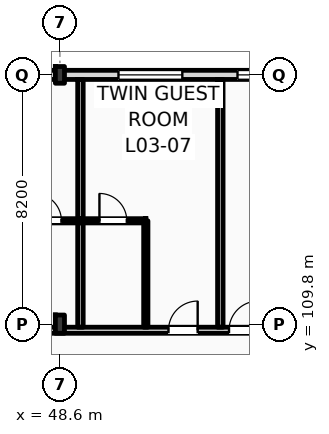
"""IFC4 building model, lengths in metres.
Left out: names, types, materials, properties, quantities, classifications, styles, units other than length and angle.
Written with IfcOpenShell. Run it as: python <this file> out.ifc"""

import sys

from ifc_helpers import new_model, si_unit, direction, frame, frame_2d, origin, origin_2d, place, context, subcontext, project, spatial, rectangle, i_section, extrude, element, fill, save


model = new_model("IFC4")
c1 = context("Model", 3, precision=1e-05, world=origin(), true_north=direction((0.0, 1.0)))
c2 = subcontext(c1, "Body", "Model", "MODEL_VIEW")
j1 = project(units=[si_unit("LENGTHUNIT", "METRE"), si_unit("PLANEANGLEUNIT", "RADIAN")], contexts=[c1])
p1 = place(None, origin())
s1 = spatial("IfcSite", under=j1, at=p1, CompositionType="ELEMENT")
p2 = place(p1, origin())
s2 = spatial("IfcBuilding", under=s1, at=p2, CompositionType="ELEMENT")
p3 = place(p2, frame((0.0, 0.0, 16.2)))
s3 = spatial("IfcBuildingStorey", under=s2, at=p3, CompositionType="ELEMENT", Elevation=16.2)
p4 = place(p3, frame((48.6, 109.8, 0.0), z_axis=(0.0, 0.0, 1.0), x_axis=(1.0, 0.0, 0.0)))
e1 = element("IfcColumn", 1, at=p4, inside=s3, PredefinedType="COLUMN", context=c2, shape_type="SweptSolid", body=[
    extrude(i_section(OverallWidth=0.3, OverallDepth=0.6, WebThickness=0.015, FlangeThickness=0.03, FilletRadius=0.027, at=origin_2d()), origin(), (0.0, 0.0, 1.0), 4.2),
])
p5 = place(p3, frame((48.6, 118.0, 0.0), z_axis=(0.0, 0.0, 1.0), x_axis=(1.0, 0.0, 0.0)))
e2 = element("IfcColumn", 2, at=p5, inside=s3, PredefinedType="COLUMN", context=c2, shape_type="SweptSolid", body=[
    extrude(i_section(OverallWidth=0.3, OverallDepth=0.55, WebThickness=0.015, FlangeThickness=0.029, FilletRadius=0.027, at=origin_2d()), origin(), (0.0, 0.0, 1.0), 4.2),
])
p6 = place(p3, frame((22.5, 118.0, 0.0), z_axis=(0.0, 0.0, 1.0), x_axis=(1.0, 0.0, 0.0)))
e3 = element("IfcWall", 3, at=p6, inside=s3, PredefinedType="STANDARD", context=c2, shape_type="SweptSolid", body=[
    extrude(rectangle(XDim=97.5, YDim=0.3, at=frame_2d((48.75, 0.0))), origin(), (0.0, 0.0, 1.0), 3.36),
])
p7 = place(p6, frame((3.721, 0.0, 0.9)))
e4 = element("IfcOpeningElement", 4, at=p7, cuts=e3, PredefinedType="OPENING", context=c2, shape_type="SweptSolid", body=[
    extrude(rectangle(XDim=0.9, YDim=1.8, at=frame_2d((0.45, 0.9))), frame((0.0, 0.16, 0.0), z_axis=(0.0, -1.0, 0.0), x_axis=(1.0, 0.0, 0.0)), (0.0, 0.0, 1.0), 0.32),
])
p8 = place(p6, frame((6.447, 0.0, 0.9)))
e5 = element("IfcOpeningElement", 5, at=p8, cuts=e3, PredefinedType="OPENING", context=c2, shape_type="SweptSolid", body=[
    extrude(rectangle(XDim=1.35, YDim=1.85, at=frame_2d((0.675, 0.925))), frame((0.0, 0.16, 0.0), z_axis=(0.0, -1.0, 0.0), x_axis=(1.0, 0.0, 0.0)), (0.0, 0.0, 1.0), 0.32),
])
p9 = place(p6, frame((11.363, 0.0, 0.9)))
e6 = element("IfcOpeningElement", 6, at=p9, cuts=e3, PredefinedType="OPENING", context=c2, shape_type="SweptSolid", body=[
    extrude(rectangle(XDim=1.5, YDim=1.9, at=frame_2d((0.75, 0.95))), frame((0.0, 0.16, 0.0), z_axis=(0.0, -1.0, 0.0), x_axis=(1.0, 0.0, 0.0)), (0.0, 0.0, 1.0), 0.32),
])
p10 = place(p6, frame((15.078, 0.0, 0.9)))
e7 = element("IfcOpeningElement", 7, at=p10, cuts=e3, PredefinedType="OPENING", context=c2, shape_type="SweptSolid", body=[
    extrude(rectangle(XDim=1.65, YDim=1.95, at=frame_2d((0.825, 0.975))), frame((0.0, 0.16, 0.0), z_axis=(0.0, -1.0, 0.0), x_axis=(1.0, 0.0, 0.0)), (0.0, 0.0, 1.0), 0.32),
])
p11 = place(p6, frame((19.395, 0.0, 0.9)))
e8 = element("IfcOpeningElement", 8, at=p11, cuts=e3, PredefinedType="OPENING", context=c2, shape_type="SweptSolid", body=[
    extrude(rectangle(XDim=1.8, YDim=2.0, at=frame_2d((0.9, 1.0))), frame((0.0, 0.16, 0.0), z_axis=(0.0, -1.0, 0.0), x_axis=(1.0, 0.0, 0.0)), (0.0, 0.0, 1.0), 0.32),
])
p12 = place(p6, frame((23.31, 0.0, 0.9)))
e9 = element("IfcOpeningElement", 9, at=p12, cuts=e3, PredefinedType="OPENING", context=c2, shape_type="SweptSolid", body=[
    extrude(rectangle(XDim=1.95, YDim=2.05, at=frame_2d((0.975, 1.025))), frame((0.0, 0.16, 0.0), z_axis=(0.0, -1.0, 0.0), x_axis=(1.0, 0.0, 0.0)), (0.0, 0.0, 1.0), 0.32),
])
p13 = place(p6, frame((28.026, 0.0, 0.9)))
e10 = element("IfcOpeningElement", 10, at=p13, cuts=e3, PredefinedType="OPENING", context=c2, shape_type="SweptSolid", body=[
    extrude(rectangle(XDim=2.1, YDim=2.1, at=frame_2d((1.05, 1.05))), frame((0.0, 0.16, 0.0), z_axis=(0.0, -1.0, 0.0), x_axis=(1.0, 0.0, 0.0)), (0.0, 0.0, 1.0), 0.32),
])
p14 = place(p6, frame((31.941, 0.0, 0.9)))
e11 = element("IfcOpeningElement", 11, at=p14, cuts=e3, PredefinedType="OPENING", context=c2, shape_type="SweptSolid", body=[
    extrude(rectangle(XDim=1.1, YDim=2.15, at=frame_2d((0.55, 1.075))), frame((0.0, 0.16, 0.0), z_axis=(0.0, -1.0, 0.0), x_axis=(1.0, 0.0, 0.0)), (0.0, 0.0, 1.0), 0.32),
])
p15 = place(p6, frame((36.657, 0.0, 0.9)))
e12 = element("IfcOpeningElement", 12, at=p15, cuts=e3, PredefinedType="OPENING", context=c2, shape_type="SweptSolid", body=[
    extrude(rectangle(XDim=2.4, YDim=2.2, at=frame_2d((1.2, 1.1))), frame((0.0, 0.16, 0.0), z_axis=(0.0, -1.0, 0.0), x_axis=(1.0, 0.0, 0.0)), (0.0, 0.0, 1.0), 0.32),
])
p16 = place(p6, frame((42.574, 0.0, 0.9)))
e13 = element("IfcOpeningElement", 13, at=p16, cuts=e3, PredefinedType="OPENING", context=c2, shape_type="SweptSolid", body=[
    extrude(rectangle(XDim=1.35, YDim=2.25, at=frame_2d((0.675, 1.125))), frame((0.0, 0.16, 0.0), z_axis=(0.0, -1.0, 0.0), x_axis=(1.0, 0.0, 0.0)), (0.0, 0.0, 1.0), 0.32),
])
p17 = place(p6, frame((45.289, 0.0, 0.9)))
e14 = element("IfcOpeningElement", 14, at=p17, cuts=e3, PredefinedType="OPENING", context=c2, shape_type="SweptSolid", body=[
    extrude(rectangle(XDim=2.7, YDim=2.28, at=frame_2d((1.35, 1.14))), frame((0.0, 0.16, 0.0), z_axis=(0.0, -1.0, 0.0), x_axis=(1.0, 0.0, 0.0)), (0.0, 0.0, 1.0), 0.32),
])
p18 = place(p6, frame((50.406, 0.0, 0.9)))
e15 = element("IfcOpeningElement", 15, at=p18, cuts=e3, PredefinedType="OPENING", context=c2, shape_type="SweptSolid", body=[
    extrude(rectangle(XDim=1.8, YDim=2.28, at=frame_2d((0.9, 1.14))), frame((0.0, 0.16, 0.0), z_axis=(0.0, -1.0, 0.0), x_axis=(1.0, 0.0, 0.0)), (0.0, 0.0, 1.0), 0.32),
])
p19 = place(p6, frame((53.922, 0.0, 0.9)))
e16 = element("IfcOpeningElement", 16, at=p19, cuts=e3, PredefinedType="OPENING", context=c2, shape_type="SweptSolid", body=[
    extrude(rectangle(XDim=1.8, YDim=2.28, at=frame_2d((0.9, 1.14))), frame((0.0, 0.16, 0.0), z_axis=(0.0, -1.0, 0.0), x_axis=(1.0, 0.0, 0.0)), (0.0, 0.0, 1.0), 0.32),
])
p20 = place(p6, frame((58.332, 0.0, 0.9)))
e17 = element("IfcOpeningElement", 17, at=p20, cuts=e3, PredefinedType="OPENING", context=c2, shape_type="SweptSolid", body=[
    extrude(rectangle(XDim=2.961, YDim=2.28, at=frame_2d((1.48, 1.14))), frame((0.0, 0.16, 0.0), z_axis=(0.0, -1.0, 0.0), x_axis=(1.0, 0.0, 0.0)), (0.0, 0.0, 1.0), 0.32),
])
p21 = place(p6, frame((62.513, 0.0, 0.9)))
e18 = element("IfcOpeningElement", 18, at=p21, cuts=e3, PredefinedType="OPENING", context=c2, shape_type="SweptSolid", body=[
    extrude(rectangle(XDim=1.8, YDim=2.28, at=frame_2d((0.9, 1.14))), frame((0.0, 0.16, 0.0), z_axis=(0.0, -1.0, 0.0), x_axis=(1.0, 0.0, 0.0)), (0.0, 0.0, 1.0), 0.32),
])
p22 = place(p6, frame((67.114, 0.0, 0.9)))
e19 = element("IfcOpeningElement", 19, at=p22, cuts=e3, PredefinedType="OPENING", context=c2, shape_type="SweptSolid", body=[
    extrude(rectangle(XDim=2.961, YDim=2.28, at=frame_2d((1.48, 1.14))), frame((0.0, 0.16, 0.0), z_axis=(0.0, -1.0, 0.0), x_axis=(1.0, 0.0, 0.0)), (0.0, 0.0, 1.0), 0.32),
])
p23 = place(p6, frame((73.695, 0.0, 0.9)))
e20 = element("IfcOpeningElement", 20, at=p23, cuts=e3, PredefinedType="OPENING", context=c2, shape_type="SweptSolid", body=[
    extrude(rectangle(XDim=1.1, YDim=2.28, at=frame_2d((0.55, 1.14))), frame((0.0, 0.16, 0.0), z_axis=(0.0, -1.0, 0.0), x_axis=(1.0, 0.0, 0.0)), (0.0, 0.0, 1.0), 0.32),
])
p24 = place(p6, frame((75.895, 0.0, 0.9)))
e21 = element("IfcOpeningElement", 21, at=p24, cuts=e3, PredefinedType="OPENING", context=c2, shape_type="SweptSolid", body=[
    extrude(rectangle(XDim=2.961, YDim=2.28, at=frame_2d((1.48, 1.14))), frame((0.0, 0.16, 0.0), z_axis=(0.0, -1.0, 0.0), x_axis=(1.0, 0.0, 0.0)), (0.0, 0.0, 1.0), 0.32),
])
p25 = place(p6, frame((81.676, 0.0, 0.9)))
e22 = element("IfcOpeningElement", 22, at=p25, cuts=e3, PredefinedType="OPENING", context=c2, shape_type="SweptSolid", body=[
    extrude(rectangle(XDim=1.8, YDim=2.28, at=frame_2d((0.9, 1.14))), frame((0.0, 0.16, 0.0), z_axis=(0.0, -1.0, 0.0), x_axis=(1.0, 0.0, 0.0)), (0.0, 0.0, 1.0), 0.32),
])
p26 = place(p6, frame((84.677, 0.0, 0.9)))
e23 = element("IfcOpeningElement", 23, at=p26, cuts=e3, PredefinedType="OPENING", context=c2, shape_type="SweptSolid", body=[
    extrude(rectangle(XDim=2.961, YDim=2.28, at=frame_2d((1.48, 1.14))), frame((0.0, 0.16, 0.0), z_axis=(0.0, -1.0, 0.0), x_axis=(1.0, 0.0, 0.0)), (0.0, 0.0, 1.0), 0.32),
])
p27 = place(p6, frame((89.999, 0.0, 0.9)))
e24 = element("IfcOpeningElement", 24, at=p27, cuts=e3, PredefinedType="OPENING", context=c2, shape_type="SweptSolid", body=[
    extrude(rectangle(XDim=1.1, YDim=1.5, at=frame_2d((0.55, 0.75))), frame((0.0, 0.16, 0.0), z_axis=(0.0, -1.0, 0.0), x_axis=(1.0, 0.0, 0.0)), (0.0, 0.0, 1.0), 0.32),
])
p28 = place(p6, frame((94.35, 0.0, 0.9)))
e25 = element("IfcOpeningElement", 25, at=p28, cuts=e3, PredefinedType="OPENING", context=c2, shape_type="SweptSolid", body=[
    extrude(rectangle(XDim=1.25, YDim=1.6, at=frame_2d((0.625, 0.8))), frame((0.0, 0.16, 0.0), z_axis=(0.0, -1.0, 0.0), x_axis=(1.0, 0.0, 0.0)), (0.0, 0.0, 1.0), 0.32),
])
p29 = place(p3, frame((10.65, 109.6, 0.0), z_axis=(0.0, 0.0, 1.0), x_axis=(1.0, 0.0, 0.0)))
e26 = element("IfcWall", 26, at=p29, inside=s3, PredefinedType="PARTITIONING", context=c2, shape_type="SweptSolid", body=[
    extrude(rectangle(XDim=109.21, YDim=0.2, at=frame_2d((54.605, 0.0))), origin(), (0.0, 0.0, 1.0), 3.36),
])
p30 = place(p29, frame((15.43, 0.0, 0.0)))
e27 = element("IfcOpeningElement", 27, at=p30, cuts=e26, PredefinedType="OPENING", context=c2, shape_type="SweptSolid", body=[
    extrude(rectangle(XDim=1.02, YDim=2.2, at=frame_2d((0.51, 1.1))), frame((0.0, 0.11, 0.0), z_axis=(0.0, -1.0, 0.0), x_axis=(1.0, 0.0, 0.0)), (0.0, 0.0, 1.0), 0.22),
])
p31 = place(p29, frame((19.537, 0.0, 0.0)))
e28 = element("IfcOpeningElement", 28, at=p31, cuts=e26, PredefinedType="OPENING", context=c2, shape_type="SweptSolid", body=[
    extrude(rectangle(XDim=1.02, YDim=2.2, at=frame_2d((0.51, 1.1))), frame((0.0, 0.11, 0.0), z_axis=(0.0, -1.0, 0.0), x_axis=(1.0, 0.0, 0.0)), (0.0, 0.0, 1.0), 0.22),
])
p32 = place(p29, frame((23.928, 0.0, 0.0)))
e29 = element("IfcOpeningElement", 29, at=p32, cuts=e26, PredefinedType="OPENING", context=c2, shape_type="SweptSolid", body=[
    extrude(rectangle(XDim=1.02, YDim=2.2, at=frame_2d((0.51, 1.1))), frame((0.0, 0.11, 0.0), z_axis=(0.0, -1.0, 0.0), x_axis=(1.0, 0.0, 0.0)), (0.0, 0.0, 1.0), 0.22),
])
p33 = place(p29, frame((26.169, 0.0, 0.0)))
e30 = element("IfcOpeningElement", 30, at=p33, cuts=e26, PredefinedType="OPENING", context=c2, shape_type="SweptSolid", body=[
    extrude(rectangle(XDim=1.02, YDim=2.2, at=frame_2d((0.51, 1.1))), frame((0.0, 0.11, 0.0), z_axis=(0.0, -1.0, 0.0), x_axis=(1.0, 0.0, 0.0)), (0.0, 0.0, 1.0), 0.22),
])
p34 = place(p29, frame((32.739, 0.0, 0.0)))
e31 = element("IfcOpeningElement", 31, at=p34, cuts=e26, PredefinedType="OPENING", context=c2, shape_type="SweptSolid", body=[
    extrude(rectangle(XDim=0.96, YDim=2.2, at=frame_2d((0.48, 1.1))), frame((0.0, 0.11, 0.0), z_axis=(0.0, -1.0, 0.0), x_axis=(1.0, 0.0, 0.0)), (0.0, 0.0, 1.0), 0.22),
])
p35 = place(p29, frame((34.98, 0.0, 0.0)))
e32 = element("IfcOpeningElement", 32, at=p35, cuts=e26, PredefinedType="OPENING", context=c2, shape_type="SweptSolid", body=[
    extrude(rectangle(XDim=0.96, YDim=2.2, at=frame_2d((0.48, 1.1))), frame((0.0, 0.11, 0.0), z_axis=(0.0, -1.0, 0.0), x_axis=(1.0, 0.0, 0.0)), (0.0, 0.0, 1.0), 0.22),
])
p36 = place(p29, frame((41.521, 0.0, 0.0)))
e33 = element("IfcOpeningElement", 33, at=p36, cuts=e26, PredefinedType="OPENING", context=c2, shape_type="SweptSolid", body=[
    extrude(rectangle(XDim=0.96, YDim=2.2, at=frame_2d((0.48, 1.1))), frame((0.0, 0.11, 0.0), z_axis=(0.0, -1.0, 0.0), x_axis=(1.0, 0.0, 0.0)), (0.0, 0.0, 1.0), 0.22),
])
p37 = place(p29, frame((43.512, 0.0, 0.0)))
e34 = element("IfcOpeningElement", 34, at=p37, cuts=e26, PredefinedType="OPENING", context=c2, shape_type="SweptSolid", body=[
    extrude(rectangle(XDim=0.96, YDim=2.2, at=frame_2d((0.48, 1.1))), frame((0.0, 0.11, 0.0), z_axis=(0.0, -1.0, 0.0), x_axis=(1.0, 0.0, 0.0)), (0.0, 0.0, 1.0), 0.22),
])
p38 = place(p29, frame((50.303, 0.0, 0.0)))
e35 = element("IfcOpeningElement", 35, at=p38, cuts=e26, PredefinedType="OPENING", context=c2, shape_type="SweptSolid", body=[
    extrude(rectangle(XDim=0.96, YDim=2.2, at=frame_2d((0.48, 1.1))), frame((0.0, 0.11, 0.0), z_axis=(0.0, -1.0, 0.0), x_axis=(1.0, 0.0, 0.0)), (0.0, 0.0, 1.0), 0.22),
])
p39 = place(p29, frame((54.944, 0.0, 0.0)))
e36 = element("IfcOpeningElement", 36, at=p39, cuts=e26, PredefinedType="OPENING", context=c2, shape_type="SweptSolid", body=[
    extrude(rectangle(XDim=0.96, YDim=2.2, at=frame_2d((0.48, 1.1))), frame((0.0, 0.11, 0.0), z_axis=(0.0, -1.0, 0.0), x_axis=(1.0, 0.0, 0.0)), (0.0, 0.0, 1.0), 0.22),
])
p40 = place(p29, frame((59.085, 0.0, 0.0)))
e37 = element("IfcOpeningElement", 37, at=p40, cuts=e26, PredefinedType="OPENING", context=c2, shape_type="SweptSolid", body=[
    extrude(rectangle(XDim=0.96, YDim=2.2, at=frame_2d((0.48, 1.1))), frame((0.0, 0.11, 0.0), z_axis=(0.0, -1.0, 0.0), x_axis=(1.0, 0.0, 0.0)), (0.0, 0.0, 1.0), 0.22),
])
p41 = place(p29, frame((63.476, 0.0, 0.0)))
e38 = element("IfcOpeningElement", 38, at=p41, cuts=e26, PredefinedType="OPENING", context=c2, shape_type="SweptSolid", body=[
    extrude(rectangle(XDim=0.96, YDim=2.2, at=frame_2d((0.48, 1.1))), frame((0.0, 0.11, 0.0), z_axis=(0.0, -1.0, 0.0), x_axis=(1.0, 0.0, 0.0)), (0.0, 0.0, 1.0), 0.22),
])
p42 = place(p29, frame((65.716, 0.0, 0.0)))
e39 = element("IfcOpeningElement", 39, at=p42, cuts=e26, PredefinedType="OPENING", context=c2, shape_type="SweptSolid", body=[
    extrude(rectangle(XDim=0.96, YDim=2.2, at=frame_2d((0.48, 1.1))), frame((0.0, 0.11, 0.0), z_axis=(0.0, -1.0, 0.0), x_axis=(1.0, 0.0, 0.0)), (0.0, 0.0, 1.0), 0.22),
])
p43 = place(p29, frame((72.257, 0.0, 0.0)))
e40 = element("IfcOpeningElement", 40, at=p43, cuts=e26, PredefinedType="OPENING", context=c2, shape_type="SweptSolid", body=[
    extrude(rectangle(XDim=0.96, YDim=2.2, at=frame_2d((0.48, 1.1))), frame((0.0, 0.11, 0.0), z_axis=(0.0, -1.0, 0.0), x_axis=(1.0, 0.0, 0.0)), (0.0, 0.0, 1.0), 0.22),
])
p44 = place(p29, frame((74.498, 0.0, 0.0)))
e41 = element("IfcOpeningElement", 41, at=p44, cuts=e26, PredefinedType="OPENING", context=c2, shape_type="SweptSolid", body=[
    extrude(rectangle(XDim=0.96, YDim=2.2, at=frame_2d((0.48, 1.1))), frame((0.0, 0.11, 0.0), z_axis=(0.0, -1.0, 0.0), x_axis=(1.0, 0.0, 0.0)), (0.0, 0.0, 1.0), 0.22),
])
p45 = place(p29, frame((81.039, 0.0, 0.0)))
e42 = element("IfcOpeningElement", 42, at=p45, cuts=e26, PredefinedType="OPENING", context=c2, shape_type="SweptSolid", body=[
    extrude(rectangle(XDim=0.96, YDim=2.2, at=frame_2d((0.48, 1.1))), frame((0.0, 0.11, 0.0), z_axis=(0.0, -1.0, 0.0), x_axis=(1.0, 0.0, 0.0)), (0.0, 0.0, 1.0), 0.22),
])
p46 = place(p29, frame((85.68, 0.0, 0.0)))
e43 = element("IfcOpeningElement", 43, at=p46, cuts=e26, PredefinedType="OPENING", context=c2, shape_type="SweptSolid", body=[
    extrude(rectangle(XDim=0.96, YDim=2.2, at=frame_2d((0.48, 1.1))), frame((0.0, 0.11, 0.0), z_axis=(0.0, -1.0, 0.0), x_axis=(1.0, 0.0, 0.0)), (0.0, 0.0, 1.0), 0.22),
])
p47 = place(p29, frame((89.82, 0.0, 0.0)))
e44 = element("IfcOpeningElement", 44, at=p47, cuts=e26, PredefinedType="OPENING", context=c2, shape_type="SweptSolid", body=[
    extrude(rectangle(XDim=0.96, YDim=2.2, at=frame_2d((0.48, 1.1))), frame((0.0, 0.11, 0.0), z_axis=(0.0, -1.0, 0.0), x_axis=(1.0, 0.0, 0.0)), (0.0, 0.0, 1.0), 0.22),
])
p48 = place(p29, frame((94.211, 0.0, 0.0)))
e45 = element("IfcOpeningElement", 45, at=p48, cuts=e26, PredefinedType="OPENING", context=c2, shape_type="SweptSolid", body=[
    extrude(rectangle(XDim=0.96, YDim=2.2, at=frame_2d((0.48, 1.1))), frame((0.0, 0.11, 0.0), z_axis=(0.0, -1.0, 0.0), x_axis=(1.0, 0.0, 0.0)), (0.0, 0.0, 1.0), 0.22),
])
p49 = place(p29, frame((98.602, 0.0, 0.0)))
e46 = element("IfcOpeningElement", 46, at=p49, cuts=e26, PredefinedType="OPENING", context=c2, shape_type="SweptSolid", body=[
    extrude(rectangle(XDim=0.96, YDim=2.2, at=frame_2d((0.48, 1.1))), frame((0.0, 0.11, 0.0), z_axis=(0.0, -1.0, 0.0), x_axis=(1.0, 0.0, 0.0)), (0.0, 0.0, 1.0), 0.22),
])
p50 = place(p29, frame((102.993, 0.0, 0.0)))
e47 = element("IfcOpeningElement", 47, at=p50, cuts=e26, PredefinedType="OPENING", context=c2, shape_type="SweptSolid", body=[
    extrude(rectangle(XDim=0.96, YDim=2.2, at=frame_2d((0.48, 1.1))), frame((0.0, 0.11, 0.0), z_axis=(0.0, -1.0, 0.0), x_axis=(1.0, 0.0, 0.0)), (0.0, 0.0, 1.0), 0.22),
])
p51 = place(p29, frame((105.269, 0.0, 0.0)))
e48 = element("IfcOpeningElement", 48, at=p51, cuts=e26, PredefinedType="OPENING", context=c2, shape_type="SweptSolid", body=[
    extrude(rectangle(XDim=0.96, YDim=2.2, at=frame_2d((0.48, 1.1))), frame((0.0, 0.11, 0.0), z_axis=(0.0, -1.0, 0.0), x_axis=(1.0, 0.0, 0.0)), (0.0, 0.0, 1.0), 0.22),
])
p52 = place(p29, frame((2.716, 0.0, 0.0)))
e49 = element("IfcOpeningElement", 49, at=p52, cuts=e26, PredefinedType="OPENING", context=c2, shape_type="SweptSolid", body=[
    extrude(rectangle(XDim=1.35, YDim=2.25, at=frame_2d((0.675, 1.125))), frame((0.0, 0.11, 0.0), z_axis=(0.0, -1.0, 0.0), x_axis=(1.0, 0.0, 0.0)), (0.0, 0.0, 1.0), 0.22),
])
p53 = place(p29, frame((6.65, 0.0, 0.0)))
e50 = element("IfcOpeningElement", 50, at=p53, cuts=e26, PredefinedType="OPENING", context=c2, shape_type="SweptSolid", body=[
    extrude(rectangle(XDim=1.35, YDim=2.25, at=frame_2d((0.675, 1.125))), frame((0.0, 0.11, 0.0), z_axis=(0.0, -1.0, 0.0), x_axis=(1.0, 0.0, 0.0)), (0.0, 0.0, 1.0), 0.22),
])
p54 = place(p29, frame((10.583, 0.0, 0.0)))
e51 = element("IfcOpeningElement", 51, at=p54, cuts=e26, PredefinedType="OPENING", context=c2, shape_type="SweptSolid", body=[
    extrude(rectangle(XDim=1.35, YDim=2.25, at=frame_2d((0.675, 1.125))), frame((0.0, 0.11, 0.0), z_axis=(0.0, -1.0, 0.0), x_axis=(1.0, 0.0, 0.0)), (0.0, 0.0, 1.0), 0.22),
])
p55 = place(p3, frame((49.275, 109.7, 0.0), z_axis=(0.0, 0.0, 1.0), x_axis=(0.0, 1.0, 0.0)))
e52 = element("IfcWall", 52, at=p55, inside=s3, PredefinedType="PARTITIONING", context=c2, shape_type="SweptSolid", body=[
    extrude(rectangle(XDim=8.15, YDim=0.18, at=frame_2d((4.075, 0.0))), origin(), (0.0, 0.0, 1.0), 3.92),
])
p56 = place(p3, frame((47.125, 113.2, 0.0), z_axis=(0.0, 0.0, 1.0), x_axis=(1.0, 0.0, 0.0)))
e53 = element("IfcWall", 53, at=p56, inside=s3, PredefinedType="PARTITIONING", context=c2, shape_type="SweptSolid", body=[
    extrude(rectangle(XDim=2.15, YDim=0.14, at=frame_2d((1.075, 0.0))), origin(), (0.0, 0.0, 1.0), 3.92),
])
p57 = place(p56, frame((0.625, 0.0, 0.0)))
e54 = element("IfcOpeningElement", 54, at=p57, cuts=e53, PredefinedType="OPENING", context=c2, shape_type="SweptSolid", body=[
    extrude(rectangle(XDim=0.9, YDim=2.1, at=frame_2d((0.45, 1.05))), frame((0.0, 0.08, 0.0), z_axis=(0.0, -1.0, 0.0), x_axis=(1.0, 0.0, 0.0)), (0.0, 0.0, 1.0), 0.16),
])
p58 = place(p3, frame((53.876, 109.7, 0.0), z_axis=(0.0, 0.0, 1.0), x_axis=(0.0, 1.0, 0.0)))
e55 = element("IfcWall", 55, at=p58, inside=s3, PredefinedType="PARTITIONING", context=c2, shape_type="SweptSolid", body=[
    extrude(rectangle(XDim=8.15, YDim=0.18, at=frame_2d((4.075, 0.0))), origin(), (0.0, 0.0, 1.0), 3.61),
])
p59 = place(p3, frame((51.425, 109.7, 0.0), z_axis=(0.0, 0.0, 1.0), x_axis=(0.0, 1.0, 0.0)))
e56 = element("IfcWall", 56, at=p59, inside=s3, PredefinedType="PARTITIONING", context=c2, shape_type="SweptSolid", body=[
    extrude(rectangle(XDim=3.5, YDim=0.14, at=frame_2d((1.75, 0.0))), origin(), (0.0, 0.0, 1.0), 3.61),
])
p60 = place(p3, frame((49.275, 113.2, 0.0), z_axis=(0.0, 0.0, 1.0), x_axis=(1.0, 0.0, 0.0)))
e57 = element("IfcWall", 57, at=p60, inside=s3, PredefinedType="PARTITIONING", context=c2, shape_type="SweptSolid", body=[
    extrude(rectangle(XDim=2.15, YDim=0.14, at=frame_2d((1.075, 0.0))), origin(), (0.0, 0.0, 1.0), 3.92),
])
p61 = place(p60, frame((0.625, 0.0, 0.0)))
e58 = element("IfcOpeningElement", 58, at=p61, cuts=e57, PredefinedType="OPENING", context=c2, shape_type="SweptSolid", body=[
    extrude(rectangle(XDim=0.9, YDim=2.1, at=frame_2d((0.45, 1.05))), frame((0.0, 0.08, 0.0), z_axis=(0.0, -1.0, 0.0), x_axis=(1.0, 0.0, 0.0)), (0.0, 0.0, 1.0), 0.16),
])
p62 = place(p13, origin())
e59 = element("IfcWindow", 59, at=p62, inside=s3, PartitioningType="DOUBLE_PANEL_VERTICAL", PredefinedType="WINDOW", context=c2, shape_type="SweptSolid", body=[
    extrude(rectangle(XDim=2.1, YDim=2.1, at=frame_2d((1.05, 1.05))), frame((0.0, 0.03, 0.0), z_axis=(0.0, -1.0, 0.0), x_axis=(1.0, 0.0, 0.0)), (0.0, 0.0, 1.0), 0.06),
])
fill(e10, e59)
p63 = place(p14, origin())
e60 = element("IfcWindow", 60, at=p63, inside=s3, PartitioningType="DOUBLE_PANEL_VERTICAL", PredefinedType="WINDOW", context=c2, shape_type="SweptSolid", body=[
    extrude(rectangle(XDim=1.1, YDim=2.15, at=frame_2d((0.55, 1.075))), frame((0.0, 0.03, 0.0), z_axis=(0.0, -1.0, 0.0), x_axis=(1.0, 0.0, 0.0)), (0.0, 0.0, 1.0), 0.06),
])
fill(e11, e60)
p64 = place(p57, origin())
e61 = element("IfcDoor", 61, at=p64, inside=s3, OperationType="SINGLE_SWING_LEFT", PredefinedType="DOOR", context=c2, shape_type="SweptSolid", body=[
    extrude(rectangle(XDim=0.9, YDim=2.1, at=frame_2d((0.45, 1.05))), frame((0.0, 0.025, 0.0), z_axis=(0.0, -1.0, 0.0), x_axis=(1.0, 0.0, 0.0)), (0.0, 0.0, 1.0), 0.05),
])
fill(e54, e61)
p65 = place(p36, origin())
e62 = element("IfcDoor", 62, at=p65, inside=s3, OperationType="SINGLE_SWING_RIGHT", PredefinedType="DOOR", context=c2, shape_type="SweptSolid", body=[
    extrude(rectangle(XDim=0.96, YDim=2.2, at=frame_2d((0.48, 1.1))), frame((0.0, 0.025, 0.0), z_axis=(0.0, -1.0, 0.0), x_axis=(1.0, 0.0, 0.0)), (0.0, 0.0, 1.0), 0.05),
])
fill(e33, e62)
p66 = place(p61, origin())
e63 = element("IfcDoor", 63, at=p66, inside=s3, OperationType="SINGLE_SWING_LEFT", PredefinedType="DOOR", context=c2, shape_type="SweptSolid", body=[
    extrude(rectangle(XDim=0.9, YDim=2.1, at=frame_2d((0.45, 1.05))), frame((0.0, 0.025, 0.0), z_axis=(0.0, -1.0, 0.0), x_axis=(1.0, 0.0, 0.0)), (0.0, 0.0, 1.0), 0.05),
])
fill(e58, e63)
p67 = place(p37, origin())
e64 = element("IfcDoor", 64, at=p67, inside=s3, OperationType="SINGLE_SWING_RIGHT", PredefinedType="DOOR", context=c2, shape_type="SweptSolid", body=[
    extrude(rectangle(XDim=0.96, YDim=2.2, at=frame_2d((0.48, 1.1))), frame((0.0, 0.025, 0.0), z_axis=(0.0, -1.0, 0.0), x_axis=(1.0, 0.0, 0.0)), (0.0, 0.0, 1.0), 0.05),
])
fill(e34, e64)
save(model, sys.argv[1])
